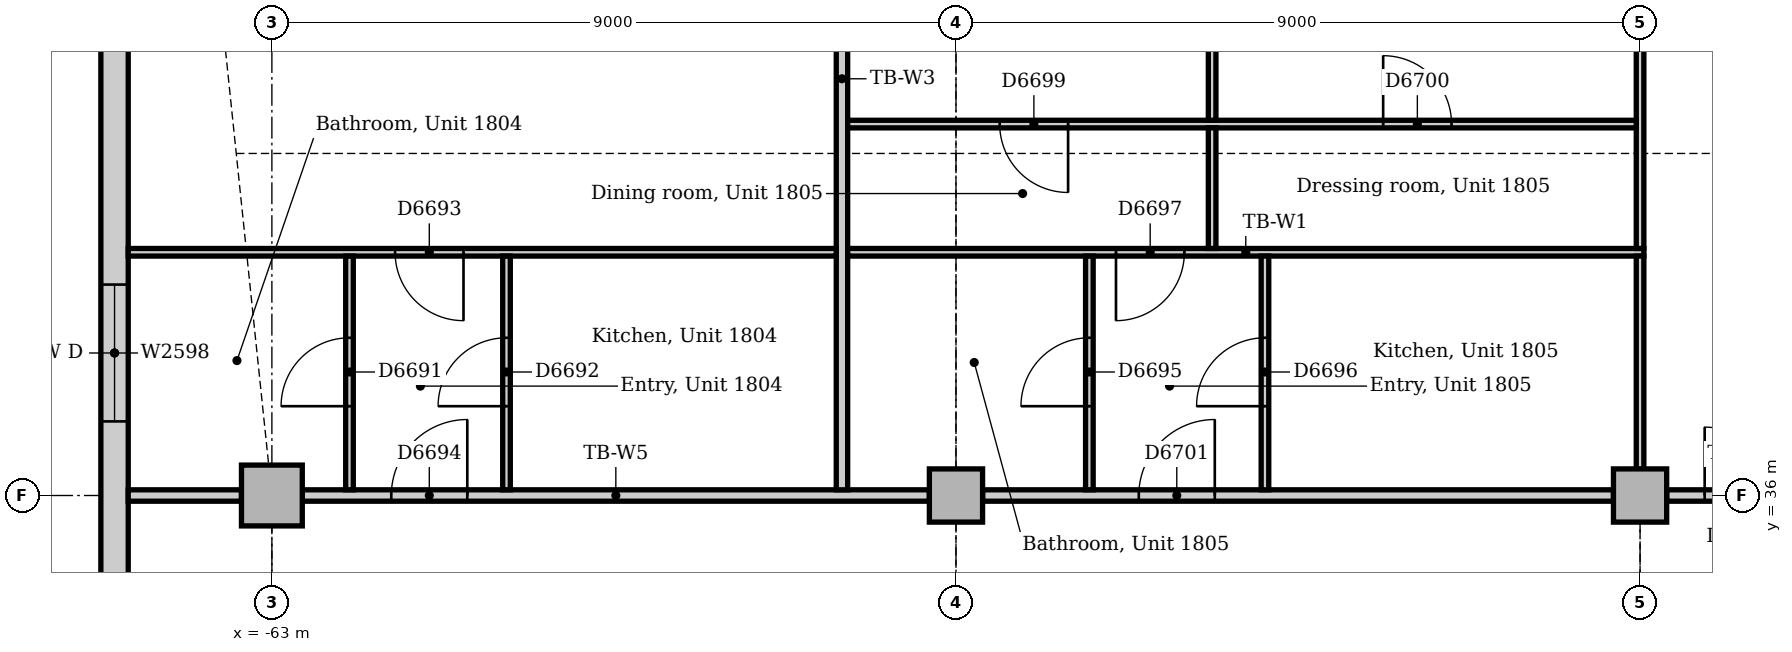
"""IFC4 building model, lengths in metres.
Left out: names, types, materials, properties, quantities, classifications, styles, units other than length and angle.
Written with IfcOpenShell. Run it as: python <this file> out.ifc"""

import sys

from ifc_helpers import new_model, si_unit, direction, frame, frame_2d, origin, origin_2d, place, context, subcontext, project, spatial, rectangle, extrude, element, fill, save


model = new_model("IFC4")
c1 = context("Model", 3, precision=1e-05, world=origin(), true_north=direction((0.0, 1.0)))
c2 = subcontext(c1, "Body", "Model", "MODEL_VIEW")
j1 = project(units=[si_unit("LENGTHUNIT", "METRE"), si_unit("PLANEANGLEUNIT", "RADIAN")], contexts=[c1])
p1 = place(None, origin())
s1 = spatial("IfcSite", under=j1, at=p1, CompositionType="ELEMENT")
p2 = place(p1, origin())
s2 = spatial("IfcBuilding", under=s1, at=p2, CompositionType="ELEMENT")
p3 = place(p2, frame((0.0, 0.0, 79.0)))
s3 = spatial("IfcBuildingStorey", under=s2, at=p3, CompositionType="ELEMENT", Elevation=79.0)
p4 = place(p3, frame((-63.0, 36.0, 0.0), z_axis=(0.0, 0.0, 1.0), x_axis=(1.0, 0.0, 0.0)))
e1 = element("IfcColumn", 1, at=p4, inside=s3, PredefinedType="COLUMN", context=c2, shape_type="SweptSolid", body=[
    extrude(rectangle(XDim=0.8, YDim=0.8, at=origin_2d()), origin(), (0.0, 0.0, 1.0), 3.85),
])
for number, where, z_axis, x_axis in (
    (2, (-54.0, 36.0, 0.0), (0.0, 0.0, 1.0), (1.0, 0.0, 0.0)),
    (3, (-45.0, 36.0, 0.0), (0.0, 0.0, 1.0), (1.0, 0.0, 0.0)),
):
    element("IfcColumn", number, at=place(p3, frame(where, z_axis=z_axis, x_axis=x_axis)), inside=s3, PredefinedType="COLUMN", context=c2, shape_type="SweptSolid", body=[
        extrude(rectangle(XDim=0.7, YDim=0.7, at=origin_2d()), origin(), (0.0, 0.0, 1.0), 3.85),
    ])
p5 = place(p3, frame((-65.07, 43.007, 0.0), z_axis=(0.0, 0.0, 1.0), x_axis=(0.0, -1.0, 0.0)))
e4 = element("IfcWall", 4, at=p5, inside=s3, PredefinedType="STANDARD", context=c2, shape_type="SweptSolid", body=[
    extrude(rectangle(XDim=23.765, YDim=0.36, at=frame_2d((11.882, 0.0))), origin(), (0.0, 0.0, 1.0), 3.85),
])
p6 = place(p5, frame((4.232, 0.0, 0.9)))
e5 = element("IfcOpeningElement", 5, at=p6, cuts=e4, PredefinedType="OPENING", context=c2, shape_type="SweptSolid", body=[
    extrude(rectangle(XDim=1.8, YDim=1.6, at=frame_2d((0.9, 0.8))), frame((0.0, 0.19, 0.0), z_axis=(0.0, -1.0, 0.0), x_axis=(1.0, 0.0, 0.0)), (0.0, 0.0, 1.0), 0.38),
])
p7 = place(p5, frame((9.332, 0.0, 0.9)))
e6 = element("IfcOpeningElement", 6, at=p7, cuts=e4, PredefinedType="OPENING", context=c2, shape_type="SweptSolid", body=[
    extrude(rectangle(XDim=1.8, YDim=1.6, at=frame_2d((0.9, 0.8))), frame((0.0, 0.19, 0.0), z_axis=(0.0, -1.0, 0.0), x_axis=(1.0, 0.0, 0.0)), (0.0, 0.0, 1.0), 0.38),
])
p8 = place(p5, frame((12.482, 0.0, 0.9)))
e7 = element("IfcOpeningElement", 7, at=p8, cuts=e4, PredefinedType="OPENING", context=c2, shape_type="SweptSolid", body=[
    extrude(rectangle(XDim=3.3, YDim=1.6, at=frame_2d((1.65, 0.8))), frame((0.0, 0.19, 0.0), z_axis=(0.0, -1.0, 0.0), x_axis=(1.0, 0.0, 0.0)), (0.0, 0.0, 1.0), 0.38),
])
p9 = place(p5, frame((16.982, 0.0, 0.9)))
e8 = element("IfcOpeningElement", 8, at=p9, cuts=e4, PredefinedType="OPENING", context=c2, shape_type="SweptSolid", body=[
    extrude(rectangle(XDim=3.3, YDim=1.6, at=frame_2d((1.65, 0.8))), frame((0.0, 0.19, 0.0), z_axis=(0.0, -1.0, 0.0), x_axis=(1.0, 0.0, 0.0)), (0.0, 0.0, 1.0), 0.38),
])
p10 = place(p3, frame((-44.65, 36.0, 0.0), z_axis=(0.0, 0.0, 1.0), x_axis=(1.0, 0.0, 0.0)))
e9 = element("IfcWall", 9, at=p10, inside=s3, PredefinedType="PARTITIONING", context=c2, shape_type="SweptSolid", body=[
    extrude(rectangle(XDim=1.925, YDim=0.15, at=frame_2d((0.963, 0.0))), origin(), (0.0, 0.0, 1.0), 3.602),
])
p11 = place(p10, frame((0.5, 0.0, 0.0)))
e10 = element("IfcOpeningElement", 10, at=p11, cuts=e9, PredefinedType="OPENING", context=c2, shape_type="SweptSolid", body=[
    extrude(rectangle(XDim=0.9, YDim=2.1, at=frame_2d((0.45, 1.05))), frame((0.0, 0.085, 0.0), z_axis=(0.0, -1.0, 0.0), x_axis=(1.0, 0.0, 0.0)), (0.0, 0.0, 1.0), 0.17),
])
p12 = place(p3, frame((-53.65, 36.0, 0.0), z_axis=(0.0, 0.0, 1.0), x_axis=(1.0, 0.0, 0.0)))
e11 = element("IfcWall", 11, at=p12, inside=s3, PredefinedType="PARTITIONING", context=c2, shape_type="SweptSolid", body=[
    extrude(rectangle(XDim=8.3, YDim=0.15, at=frame_2d((4.15, 0.0))), origin(), (0.0, 0.0, 1.0), 3.158),
])
p13 = place(p12, frame((2.055, 0.0, 0.0)))
e12 = element("IfcOpeningElement", 12, at=p13, cuts=e11, PredefinedType="OPENING", context=c2, shape_type="SweptSolid", body=[
    extrude(rectangle(XDim=1.0, YDim=2.1, at=frame_2d((0.5, 1.05))), frame((0.0, 0.085, 0.0), z_axis=(0.0, -1.0, 0.0), x_axis=(1.0, 0.0, 0.0)), (0.0, 0.0, 1.0), 0.17),
])
p14 = place(p3, frame((-62.6, 36.0, 0.0), z_axis=(0.0, 0.0, 1.0), x_axis=(1.0, 0.0, 0.0)))
e13 = element("IfcWall", 13, at=p14, inside=s3, PredefinedType="PARTITIONING", context=c2, shape_type="SweptSolid", body=[
    extrude(rectangle(XDim=8.25, YDim=0.15, at=frame_2d((4.125, 0.0))), origin(), (0.0, 0.0, 1.0), 3.158),
])
p15 = place(p14, frame((1.171, 0.0, 0.0)))
e14 = element("IfcOpeningElement", 14, at=p15, cuts=e13, PredefinedType="OPENING", context=c2, shape_type="SweptSolid", body=[
    extrude(rectangle(XDim=1.0, YDim=2.1, at=frame_2d((0.5, 1.05))), frame((0.0, 0.085, 0.0), z_axis=(0.0, -1.0, 0.0), x_axis=(1.0, 0.0, 0.0)), (0.0, 0.0, 1.0), 0.17),
])
p16 = place(p3, frame((-64.89, 36.0, 0.0), z_axis=(0.0, 0.0, 1.0), x_axis=(1.0, 0.0, 0.0)))
e15 = element("IfcWall", 15, at=p16, inside=s3, PredefinedType="PARTITIONING", context=c2, shape_type="SweptSolid", body=[
    extrude(rectangle(XDim=1.49, YDim=0.15, at=frame_2d((0.745, 0.0))), origin(), (0.0, 0.0, 1.0), 3.85),
])
p17 = place(p3, frame((-55.5, 36.075, 0.0), z_axis=(0.0, 0.0, 1.0), x_axis=(0.0, 1.0, 0.0)))
e16 = element("IfcWall", 16, at=p17, inside=s3, PredefinedType="PARTITIONING", context=c2, shape_type="SweptSolid", body=[
    extrude(rectangle(XDim=10.815, YDim=0.15, at=frame_2d((5.407, 0.0))), origin(), (0.0, 0.0, 1.0), 3.85),
])
p18 = place(p3, frame((-55.425, 39.2, 0.0), z_axis=(0.0, 0.0, 1.0), x_axis=(1.0, 0.0, 0.0)))
e17 = element("IfcWall", 17, at=p18, inside=s3, PredefinedType="PARTITIONING", context=c2, shape_type="SweptSolid", body=[
    extrude(rectangle(XDim=10.475, YDim=0.1, at=frame_2d((5.237, 0.0))), origin(), (0.0, 0.0, 1.0), 3.85),
])
p19 = place(p18, frame((3.53, 0.0, 0.0)))
e18 = element("IfcOpeningElement", 18, at=p19, cuts=e17, PredefinedType="OPENING", context=c2, shape_type="SweptSolid", body=[
    extrude(rectangle(XDim=0.9, YDim=2.1, at=frame_2d((0.45, 1.05))), frame((0.0, 0.06, 0.0), z_axis=(0.0, -1.0, 0.0), x_axis=(1.0, 0.0, 0.0)), (0.0, 0.0, 1.0), 0.12),
])
p20 = place(p3, frame((-64.89, 39.2, 0.0), z_axis=(0.0, 0.0, 1.0), x_axis=(1.0, 0.0, 0.0)))
e19 = element("IfcWall", 19, at=p20, inside=s3, PredefinedType="PARTITIONING", context=c2, shape_type="SweptSolid", body=[
    extrude(rectangle(XDim=9.315, YDim=0.1, at=frame_2d((4.657, 0.0))), origin(), (0.0, 0.0, 1.0), 3.85),
])
p21 = place(p20, frame((3.511, 0.0, 0.0)))
e20 = element("IfcOpeningElement", 20, at=p21, cuts=e19, PredefinedType="OPENING", context=c2, shape_type="SweptSolid", body=[
    extrude(rectangle(XDim=0.9, YDim=2.1, at=frame_2d((0.45, 1.05))), frame((0.0, 0.06, 0.0), z_axis=(0.0, -1.0, 0.0), x_axis=(1.0, 0.0, 0.0)), (0.0, 0.0, 1.0), 0.12),
])
p22 = place(p3, frame((-45.0, 39.25, 0.0), z_axis=(0.0, 0.0, 1.0), x_axis=(0.0, 1.0, 0.0)))
e21 = element("IfcWall", 21, at=p22, inside=s3, PredefinedType="PARTITIONING", context=c2, shape_type="SweptSolid", body=[
    extrude(rectangle(XDim=6.7, YDim=0.1, at=frame_2d((3.35, 0.0))), origin(), (0.0, 0.0, 1.0), 3.256),
])
p23 = place(p3, frame((-45.0, 36.35, 0.0), z_axis=(0.0, 0.0, 1.0), x_axis=(0.0, 1.0, 0.0)))
e22 = element("IfcWall", 22, at=p23, inside=s3, PredefinedType="PARTITIONING", context=c2, shape_type="SweptSolid", body=[
    extrude(rectangle(XDim=2.8, YDim=0.1, at=frame_2d((1.4, 0.0))), origin(), (0.0, 0.0, 1.0), 3.256),
])
p24 = place(p3, frame((-55.425, 40.886, 0.0), z_axis=(0.0, 0.0, 1.0), x_axis=(1.0, 0.0, 0.0)))
e23 = element("IfcWall", 23, at=p24, inside=s3, PredefinedType="PARTITIONING", context=c2, shape_type="SweptSolid", body=[
    extrude(rectangle(XDim=10.375, YDim=0.1, at=frame_2d((5.188, 0.0))), origin(), (0.0, 0.0, 1.0), 3.85),
])
p25 = place(p24, frame((2.0, 0.0, 0.0)))
e24 = element("IfcOpeningElement", 24, at=p25, cuts=e23, PredefinedType="OPENING", context=c2, shape_type="SweptSolid", body=[
    extrude(rectangle(XDim=0.9, YDim=2.1, at=frame_2d((0.45, 1.05))), frame((0.0, 0.06, 0.0), z_axis=(0.0, -1.0, 0.0), x_axis=(1.0, 0.0, 0.0)), (0.0, 0.0, 1.0), 0.12),
])
p26 = place(p24, frame((7.045, 0.0, 0.0)))
e25 = element("IfcOpeningElement", 25, at=p26, cuts=e23, PredefinedType="OPENING", context=c2, shape_type="SweptSolid", body=[
    extrude(rectangle(XDim=0.9, YDim=2.1, at=frame_2d((0.45, 1.05))), frame((0.0, 0.06, 0.0), z_axis=(0.0, -1.0, 0.0), x_axis=(1.0, 0.0, 0.0)), (0.0, 0.0, 1.0), 0.12),
])
p27 = place(p3, frame((-50.63, 39.25, 0.0), z_axis=(0.0, 0.0, 1.0), x_axis=(0.0, 1.0, 0.0)))
e26 = element("IfcWall", 26, at=p27, inside=s3, PredefinedType="PARTITIONING", context=c2, shape_type="SweptSolid", body=[
    extrude(rectangle(XDim=1.587, YDim=0.1, at=frame_2d((0.793, 0.0))), origin(), (0.0, 0.0, 1.0), 3.85),
])
p28 = place(p3, frame((-50.63, 40.937, 0.0), z_axis=(0.0, 0.0, 1.0), x_axis=(0.0, 1.0, 0.0)))
e27 = element("IfcWall", 27, at=p28, inside=s3, PredefinedType="PARTITIONING", context=c2, shape_type="SweptSolid", body=[
    extrude(rectangle(XDim=5.954, YDim=0.1, at=frame_2d((2.977, 0.0))), origin(), (0.0, 0.0, 1.0), 3.85),
])
p29 = place(p28, frame((2.55, 0.0, 0.0)))
e28 = element("IfcOpeningElement", 28, at=p29, cuts=e27, PredefinedType="OPENING", context=c2, shape_type="SweptSolid", body=[
    extrude(rectangle(XDim=0.9, YDim=2.1, at=frame_2d((0.45, 1.05))), frame((0.0, 0.06, 0.0), z_axis=(0.0, -1.0, 0.0), x_axis=(1.0, 0.0, 0.0)), (0.0, 0.0, 1.0), 0.12),
])
p30 = place(p3, frame((-61.979, 36.075, 0.0), z_axis=(0.0, 0.0, 1.0), x_axis=(0.0, 1.0, 0.0)))
e29 = element("IfcWall", 29, at=p30, inside=s3, PredefinedType="PARTITIONING", context=c2, shape_type="SweptSolid", body=[
    extrude(rectangle(XDim=3.075, YDim=0.1, at=frame_2d((1.538, 0.0))), origin(), (0.0, 0.0, 1.0), 3.85),
])
p31 = place(p30, frame((1.1, 0.0, 0.0)))
e30 = element("IfcOpeningElement", 30, at=p31, cuts=e29, PredefinedType="OPENING", context=c2, shape_type="SweptSolid", body=[
    extrude(rectangle(XDim=0.9, YDim=2.1, at=frame_2d((0.45, 1.05))), frame((0.0, 0.06, 0.0), z_axis=(0.0, -1.0, 0.0), x_axis=(1.0, 0.0, 0.0)), (0.0, 0.0, 1.0), 0.12),
])
p32 = place(p3, frame((-59.913, 36.075, 0.0), z_axis=(0.0, 0.0, 1.0), x_axis=(0.0, 1.0, 0.0)))
e31 = element("IfcWall", 31, at=p32, inside=s3, PredefinedType="PARTITIONING", context=c2, shape_type="SweptSolid", body=[
    extrude(rectangle(XDim=3.075, YDim=0.1, at=frame_2d((1.538, 0.0))), origin(), (0.0, 0.0, 1.0), 3.85),
])
p33 = place(p32, frame((1.1, 0.0, 0.0)))
e32 = element("IfcOpeningElement", 32, at=p33, cuts=e31, PredefinedType="OPENING", context=c2, shape_type="SweptSolid", body=[
    extrude(rectangle(XDim=0.9, YDim=2.1, at=frame_2d((0.45, 1.05))), frame((0.0, 0.06, 0.0), z_axis=(0.0, -1.0, 0.0), x_axis=(1.0, 0.0, 0.0)), (0.0, 0.0, 1.0), 0.12),
])
p34 = place(p3, frame((-52.245, 36.075, 0.0), z_axis=(0.0, 0.0, 1.0), x_axis=(0.0, 1.0, 0.0)))
e33 = element("IfcWall", 33, at=p34, inside=s3, PredefinedType="PARTITIONING", context=c2, shape_type="SweptSolid", body=[
    extrude(rectangle(XDim=3.075, YDim=0.1, at=frame_2d((1.538, 0.0))), origin(), (0.0, 0.0, 1.0), 3.85),
])
p35 = place(p34, frame((1.1, 0.0, 0.0)))
e34 = element("IfcOpeningElement", 34, at=p35, cuts=e33, PredefinedType="OPENING", context=c2, shape_type="SweptSolid", body=[
    extrude(rectangle(XDim=0.9, YDim=2.1, at=frame_2d((0.45, 1.05))), frame((0.0, 0.06, 0.0), z_axis=(0.0, -1.0, 0.0), x_axis=(1.0, 0.0, 0.0)), (0.0, 0.0, 1.0), 0.12),
])
p36 = place(p3, frame((-49.935, 36.075, 0.0), z_axis=(0.0, 0.0, 1.0), x_axis=(0.0, 1.0, 0.0)))
e35 = element("IfcWall", 35, at=p36, inside=s3, PredefinedType="PARTITIONING", context=c2, shape_type="SweptSolid", body=[
    extrude(rectangle(XDim=3.075, YDim=0.1, at=frame_2d((1.538, 0.0))), origin(), (0.0, 0.0, 1.0), 3.85),
])
p37 = place(p36, frame((1.1, 0.0, 0.0)))
e36 = element("IfcOpeningElement", 36, at=p37, cuts=e35, PredefinedType="OPENING", context=c2, shape_type="SweptSolid", body=[
    extrude(rectangle(XDim=0.9, YDim=2.1, at=frame_2d((0.45, 1.05))), frame((0.0, 0.06, 0.0), z_axis=(0.0, -1.0, 0.0), x_axis=(1.0, 0.0, 0.0)), (0.0, 0.0, 1.0), 0.12),
])
p38 = place(p6, origin())
e37 = element("IfcWindow", 37, at=p38, inside=s3, PartitioningType="SINGLE_PANEL", PredefinedType="WINDOW", context=c2, shape_type="SweptSolid", body=[
    extrude(rectangle(XDim=1.8, YDim=1.6, at=frame_2d((0.9, 0.8))), frame((0.0, 0.13, 0.0), z_axis=(0.0, -1.0, 0.0), x_axis=(1.0, 0.0, 0.0)), (0.0, 0.0, 1.0), 0.06),
])
fill(e5, e37)
p39 = place(p11, origin())
e38 = element("IfcDoor", 38, at=p39, inside=s3, OperationType="SINGLE_SWING_LEFT", PredefinedType="DOOR", context=c2, shape_type="SweptSolid", body=[
    extrude(rectangle(XDim=0.9, YDim=2.1, at=frame_2d((0.45, 1.05))), frame((0.0, 0.025, 0.0), z_axis=(0.0, -1.0, 0.0), x_axis=(1.0, 0.0, 0.0)), (0.0, 0.0, 1.0), 0.05),
])
fill(e10, e38)
p40 = place(p31, origin())
e39 = element("IfcDoor", 39, at=p40, inside=s3, OperationType="SINGLE_SWING_LEFT", PredefinedType="DOOR", context=c2, shape_type="SweptSolid", body=[
    extrude(rectangle(XDim=0.9, YDim=2.1, at=frame_2d((0.45, 1.05))), frame((0.0, 0.025, 0.0), z_axis=(0.0, -1.0, 0.0), x_axis=(1.0, 0.0, 0.0)), (0.0, 0.0, 1.0), 0.05),
])
fill(e30, e39)
p41 = place(p33, origin())
e40 = element("IfcDoor", 40, at=p41, inside=s3, OperationType="SINGLE_SWING_LEFT", PredefinedType="DOOR", context=c2, shape_type="SweptSolid", body=[
    extrude(rectangle(XDim=0.9, YDim=2.1, at=frame_2d((0.45, 1.05))), frame((0.0, 0.025, 0.0), z_axis=(0.0, -1.0, 0.0), x_axis=(1.0, 0.0, 0.0)), (0.0, 0.0, 1.0), 0.05),
])
fill(e32, e40)
p42 = place(p21, frame((0.9, 0.0, 0.0), z_axis=(0.0, 0.0, 1.0), x_axis=(-1.0, 0.0, 0.0)))
e41 = element("IfcDoor", 41, at=p42, inside=s3, OperationType="SINGLE_SWING_LEFT", PredefinedType="DOOR", context=c2, shape_type="SweptSolid", body=[
    extrude(rectangle(XDim=0.9, YDim=2.1, at=frame_2d((0.45, 1.05))), frame((0.0, 0.025, 0.0), z_axis=(0.0, -1.0, 0.0), x_axis=(1.0, 0.0, 0.0)), (0.0, 0.0, 1.0), 0.05),
])
fill(e20, e41)
p43 = place(p15, origin())
e42 = element("IfcDoor", 42, at=p43, inside=s3, OperationType="SINGLE_SWING_RIGHT", PredefinedType="DOOR", context=c2, shape_type="SweptSolid", body=[
    extrude(rectangle(XDim=1.0, YDim=2.1, at=frame_2d((0.5, 1.05))), frame((0.0, 0.025, 0.0), z_axis=(0.0, -1.0, 0.0), x_axis=(1.0, 0.0, 0.0)), (0.0, 0.0, 1.0), 0.05),
])
fill(e14, e42)
p44 = place(p35, origin())
e43 = element("IfcDoor", 43, at=p44, inside=s3, OperationType="SINGLE_SWING_LEFT", PredefinedType="DOOR", context=c2, shape_type="SweptSolid", body=[
    extrude(rectangle(XDim=0.9, YDim=2.1, at=frame_2d((0.45, 1.05))), frame((0.0, 0.025, 0.0), z_axis=(0.0, -1.0, 0.0), x_axis=(1.0, 0.0, 0.0)), (0.0, 0.0, 1.0), 0.05),
])
fill(e34, e43)
p45 = place(p37, origin())
e44 = element("IfcDoor", 44, at=p45, inside=s3, OperationType="SINGLE_SWING_LEFT", PredefinedType="DOOR", context=c2, shape_type="SweptSolid", body=[
    extrude(rectangle(XDim=0.9, YDim=2.1, at=frame_2d((0.45, 1.05))), frame((0.0, 0.025, 0.0), z_axis=(0.0, -1.0, 0.0), x_axis=(1.0, 0.0, 0.0)), (0.0, 0.0, 1.0), 0.05),
])
fill(e36, e44)
p46 = place(p19, frame((0.9, 0.0, 0.0), z_axis=(0.0, 0.0, 1.0), x_axis=(-1.0, 0.0, 0.0)))
e45 = element("IfcDoor", 45, at=p46, inside=s3, OperationType="SINGLE_SWING_RIGHT", PredefinedType="DOOR", context=c2, shape_type="SweptSolid", body=[
    extrude(rectangle(XDim=0.9, YDim=2.1, at=frame_2d((0.45, 1.05))), frame((0.0, 0.025, 0.0), z_axis=(0.0, -1.0, 0.0), x_axis=(1.0, 0.0, 0.0)), (0.0, 0.0, 1.0), 0.05),
])
fill(e18, e45)
p47 = place(p25, frame((0.9, 0.0, 0.0), z_axis=(0.0, 0.0, 1.0), x_axis=(-1.0, 0.0, 0.0)))
e46 = element("IfcDoor", 46, at=p47, inside=s3, OperationType="SINGLE_SWING_LEFT", PredefinedType="DOOR", context=c2, shape_type="SweptSolid", body=[
    extrude(rectangle(XDim=0.9, YDim=2.1, at=frame_2d((0.45, 1.05))), frame((0.0, 0.025, 0.0), z_axis=(0.0, -1.0, 0.0), x_axis=(1.0, 0.0, 0.0)), (0.0, 0.0, 1.0), 0.05),
])
fill(e24, e46)
p48 = place(p26, origin())
e47 = element("IfcDoor", 47, at=p48, inside=s3, OperationType="SINGLE_SWING_LEFT", PredefinedType="DOOR", context=c2, shape_type="SweptSolid", body=[
    extrude(rectangle(XDim=0.9, YDim=2.1, at=frame_2d((0.45, 1.05))), frame((0.0, 0.025, 0.0), z_axis=(0.0, -1.0, 0.0), x_axis=(1.0, 0.0, 0.0)), (0.0, 0.0, 1.0), 0.05),
])
fill(e25, e47)
p49 = place(p13, origin())
e48 = element("IfcDoor", 48, at=p49, inside=s3, OperationType="SINGLE_SWING_RIGHT", PredefinedType="DOOR", context=c2, shape_type="SweptSolid", body=[
    extrude(rectangle(XDim=1.0, YDim=2.1, at=frame_2d((0.5, 1.05))), frame((0.0, 0.025, 0.0), z_axis=(0.0, -1.0, 0.0), x_axis=(1.0, 0.0, 0.0)), (0.0, 0.0, 1.0), 0.05),
])
fill(e12, e48)
save(model, sys.argv[1])
